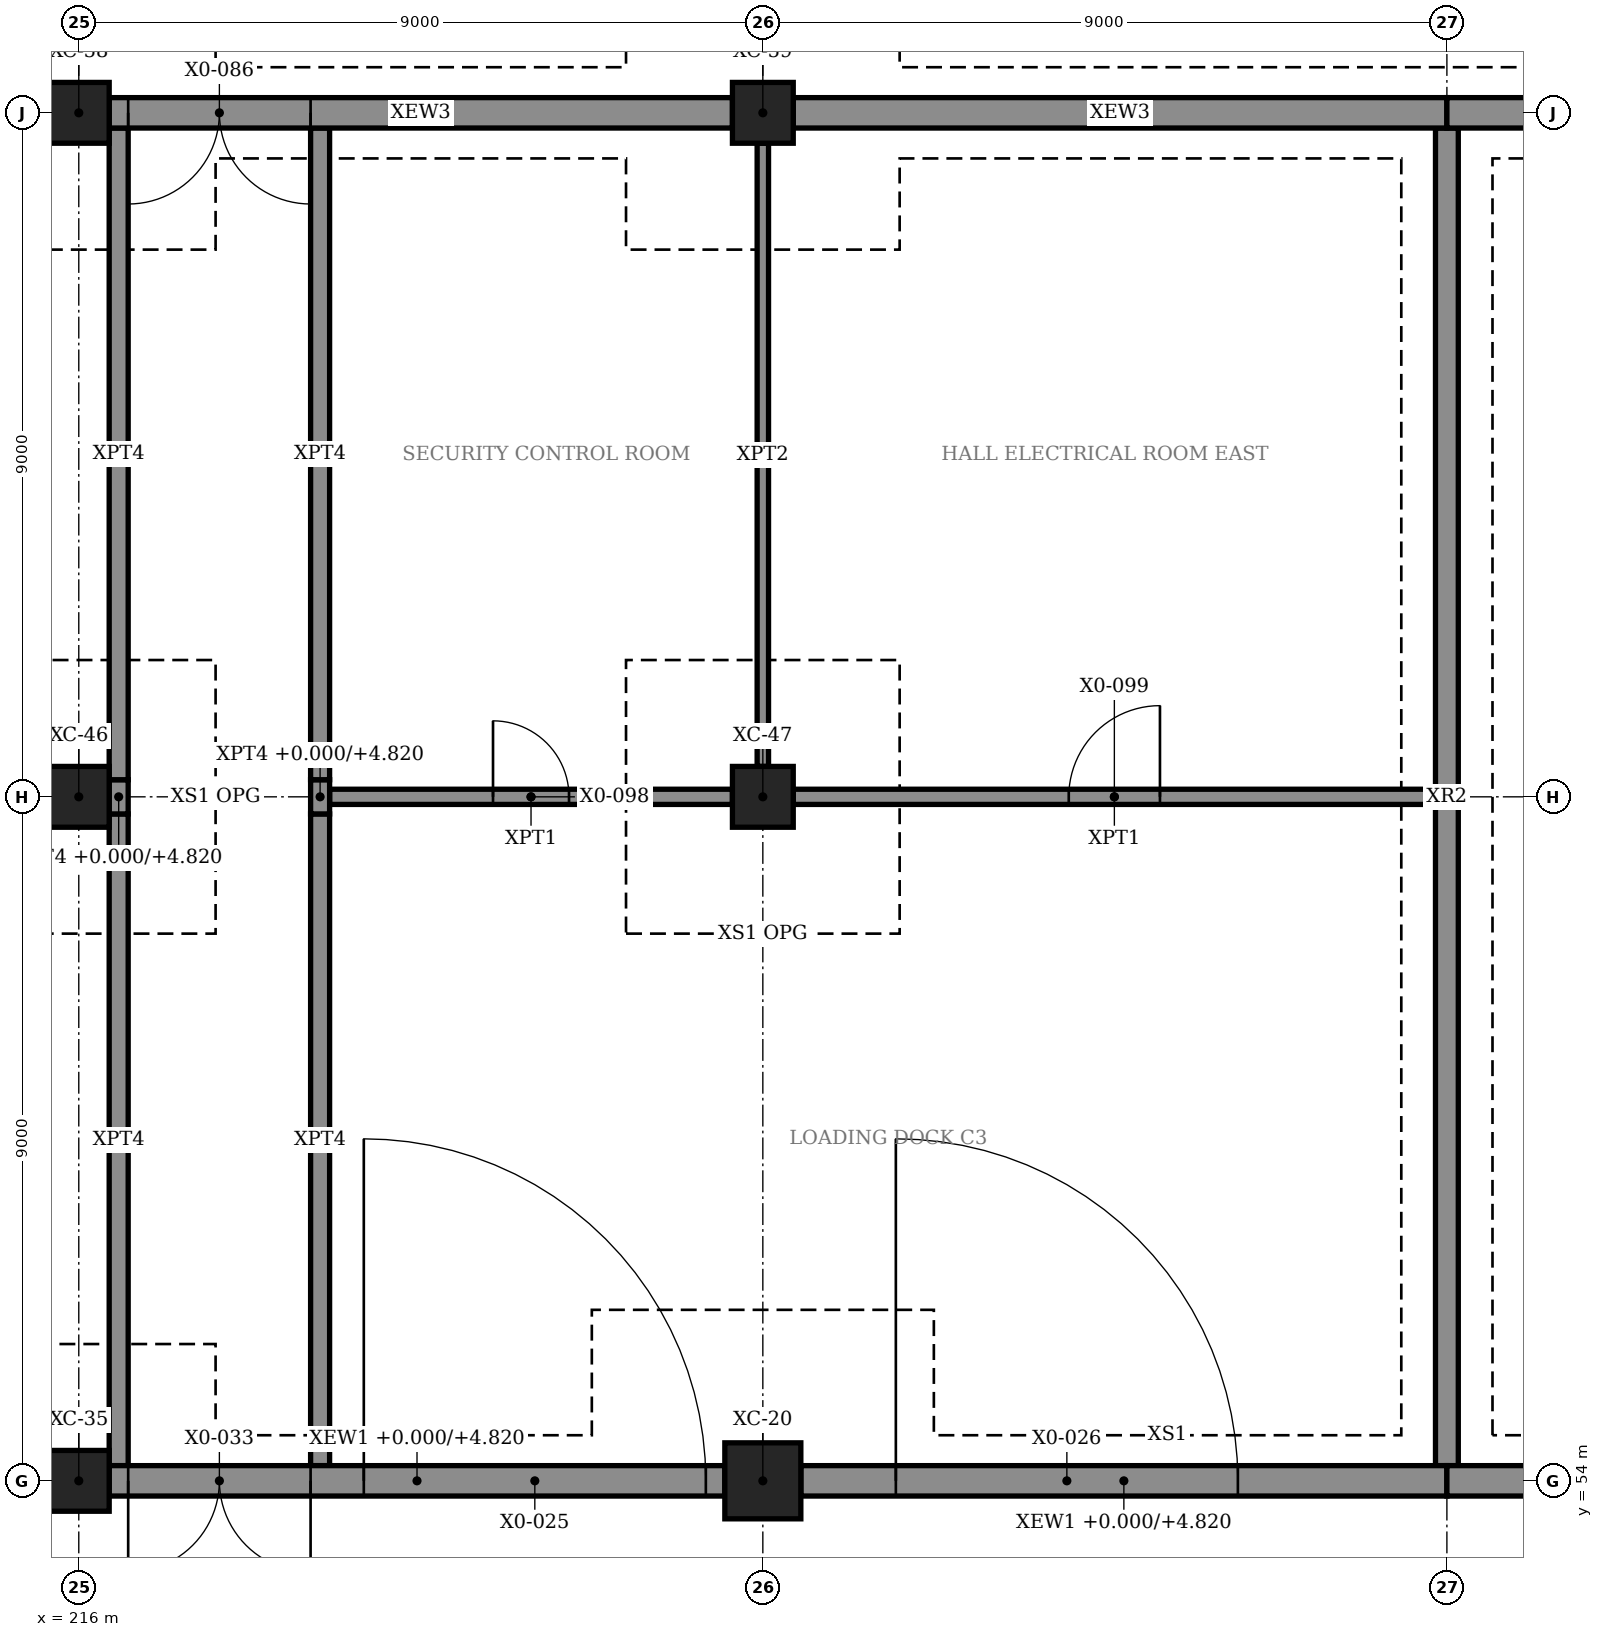
"""IFC4 building model, lengths in metres.
Left out: names, types, materials, properties, quantities, classifications, styles, units other than length and angle.
Written with IfcOpenShell. Run it as: python <this file> out.ifc"""

import sys

from ifc_helpers import new_model, si_unit, direction, frame, frame_2d, origin, origin_2d, place, context, subcontext, project, spatial, rectangle, hollow_rectangle, extrude, element, fill, save


model = new_model("IFC4")
c1 = context("Model", 3, precision=1e-05, world=origin(), true_north=direction((0.0, 1.0)))
c2 = subcontext(c1, "Body", "Model", "MODEL_VIEW")
j1 = project(units=[si_unit("LENGTHUNIT", "METRE"), si_unit("PLANEANGLEUNIT", "RADIAN")], contexts=[c1])
p1 = place(None, origin())
s1 = spatial("IfcSite", under=j1, at=p1, CompositionType="ELEMENT")
p2 = place(p1, origin())
s2 = spatial("IfcBuilding", under=s1, at=p2, CompositionType="ELEMENT")
p3 = place(p2, origin())
s3 = spatial("IfcBuildingStorey", under=s2, at=p3, CompositionType="ELEMENT", Elevation=0.0)
p4 = place(p3, frame((225.0, 54.0, 0.0), z_axis=(0.0, 0.0, 1.0), x_axis=(1.0, 0.0, 0.0)))
e1 = element("IfcColumn", 1, at=p4, inside=s3, PredefinedType="COLUMN", context=c2, shape_type="SweptSolid", body=[
    extrude(hollow_rectangle(XDim=1.0, YDim=1.0, WallThickness=0.032, at=origin_2d()), origin(), (0.0, 0.0, 1.0), 6.0),
])
for number, where, z_axis, x_axis in (
    (2, (216.0, 54.0, 0.0), (0.0, 0.0, 1.0), (1.0, 0.0, 0.0)),
    (3, (216.0, 63.0, 0.0), (0.0, 0.0, 1.0), (1.0, 0.0, 0.0)),
    (4, (225.0, 63.0, 0.0), (0.0, 0.0, 1.0), (1.0, 0.0, 0.0)),
    (5, (216.0, 72.0, 0.0), (0.0, 0.0, 1.0), (1.0, 0.0, 0.0)),
    (6, (225.0, 72.0, 0.0), (0.0, 0.0, 1.0), (1.0, 0.0, 0.0)),
):
    element("IfcColumn", number, at=place(p3, frame(where, z_axis=z_axis, x_axis=x_axis)), inside=s3, PredefinedType="COLUMN", context=c2, shape_type="SweptSolid", body=[
        extrude(rectangle(XDim=0.8, YDim=0.8, at=origin_2d()), origin(), (0.0, 0.0, 1.0), 6.0),
    ])
p5 = place(p3, frame((234.0, 54.2, 0.0), z_axis=(0.0, 0.0, 1.0), x_axis=(0.0, 1.0, 0.0)))
e7 = element("IfcWall", 7, at=p5, inside=s3, PredefinedType="SOLIDWALL", context=c2, shape_type="SweptSolid", body=[
    extrude(rectangle(XDim=17.6, YDim=0.3, at=frame_2d((8.8, 0.0))), origin(), (0.0, 0.0, 1.0), 5.72),
])
p6 = place(p3, frame((216.4, 54.0, 0.0), z_axis=(0.0, 0.0, 1.0), x_axis=(1.0, 0.0, 0.0)))
e8 = element("IfcWall", 8, at=p6, inside=s3, PredefinedType="SOLIDWALL", context=c2, shape_type="SweptSolid", body=[
    extrude(rectangle(XDim=8.1, YDim=0.4, at=frame_2d((4.05, 0.0))), origin(), (0.0, 0.0, 1.0), 4.82),
])
p7 = place(p6, frame((3.35, 0.0, 0.0)))
e9 = element("IfcOpeningElement", 9, at=p7, cuts=e8, PredefinedType="OPENING", context=c2, shape_type="SweptSolid", body=[
    extrude(rectangle(XDim=4.5, YDim=4.5, at=frame_2d((2.25, 2.25))), frame((0.0, 0.21, 0.0), z_axis=(0.0, -1.0, 0.0), x_axis=(1.0, 0.0, 0.0)), (0.0, 0.0, 1.0), 0.42),
])
p8 = place(p6, frame((0.25, 0.0, 0.0)))
e10 = element("IfcOpeningElement", 10, at=p8, cuts=e8, PredefinedType="OPENING", context=c2, shape_type="SweptSolid", body=[
    extrude(rectangle(XDim=2.4, YDim=2.4, at=frame_2d((1.2, 1.2))), frame((0.0, 0.21, 0.0), z_axis=(0.0, -1.0, 0.0), x_axis=(1.0, 0.0, 0.0)), (0.0, 0.0, 1.0), 0.42),
])
p9 = place(p3, frame((225.5, 54.0, 0.0), z_axis=(0.0, 0.0, 1.0), x_axis=(1.0, 0.0, 0.0)))
e11 = element("IfcWall", 11, at=p9, inside=s3, PredefinedType="SOLIDWALL", context=c2, shape_type="SweptSolid", body=[
    extrude(rectangle(XDim=8.5, YDim=0.4, at=frame_2d((4.25, 0.0))), origin(), (0.0, 0.0, 1.0), 4.82),
])
p10 = place(p9, frame((1.25, 0.0, 0.0)))
e12 = element("IfcOpeningElement", 12, at=p10, cuts=e11, PredefinedType="OPENING", context=c2, shape_type="SweptSolid", body=[
    extrude(rectangle(XDim=4.5, YDim=4.5, at=frame_2d((2.25, 2.25))), frame((0.0, 0.21, 0.0), z_axis=(0.0, -1.0, 0.0), x_axis=(1.0, 0.0, 0.0)), (0.0, 0.0, 1.0), 0.42),
])
p11 = place(p3, frame((234.0, 54.0, 0.0), z_axis=(0.0, 0.0, 1.0), x_axis=(1.0, 0.0, 0.0)))
e13 = element("IfcWall", 13, at=p11, inside=s3, PredefinedType="SOLIDWALL", context=c2, shape_type="SweptSolid", body=[
    extrude(rectangle(XDim=8.5, YDim=0.4, at=frame_2d((4.25, 0.0))), origin(), (0.0, 0.0, 1.0), 5.3),
])
p12 = place(p11, frame((1.9, 0.0, 0.0)))
e14 = element("IfcOpeningElement", 14, at=p12, cuts=e13, PredefinedType="OPENING", context=c2, shape_type="SweptSolid", body=[
    extrude(rectangle(XDim=5.2, YDim=5.2, at=frame_2d((2.6, 2.6))), frame((0.0, 0.21, 0.0), z_axis=(0.0, -1.0, 0.0), x_axis=(1.0, 0.0, 0.0)), (0.0, 0.0, 1.0), 0.42),
])
p13 = place(p3, frame((216.4, 72.0, 0.0), z_axis=(0.0, 0.0, 1.0), x_axis=(1.0, 0.0, 0.0)))
e15 = element("IfcWall", 15, at=p13, inside=s3, PredefinedType="SOLIDWALL", context=c2, shape_type="SweptSolid", body=[
    extrude(rectangle(XDim=8.2, YDim=0.4, at=frame_2d((4.1, 0.0))), origin(), (0.0, 0.0, 1.0), 4.82),
])
p14 = place(p13, frame((0.25, 0.0, 0.0)))
e16 = element("IfcOpeningElement", 16, at=p14, cuts=e15, PredefinedType="OPENING", context=c2, shape_type="SweptSolid", body=[
    extrude(rectangle(XDim=2.4, YDim=2.4, at=frame_2d((1.2, 1.2))), frame((0.0, 0.21, 0.0), z_axis=(0.0, -1.0, 0.0), x_axis=(1.0, 0.0, 0.0)), (0.0, 0.0, 1.0), 0.42),
])
p15 = place(p3, frame((225.4, 72.0, 0.0), z_axis=(0.0, 0.0, 1.0), x_axis=(1.0, 0.0, 0.0)))
e17 = element("IfcWall", 17, at=p15, inside=s3, PredefinedType="SOLIDWALL", context=c2, shape_type="SweptSolid", body=[
    extrude(rectangle(XDim=8.6, YDim=0.4, at=frame_2d((4.3, 0.0))), origin(), (0.0, 0.0, 1.0), 4.82),
])
p16 = place(p3, frame((234.0, 72.0, 0.0), z_axis=(0.0, 0.0, 1.0), x_axis=(1.0, 0.0, 0.0)))
e18 = element("IfcWall", 18, at=p16, inside=s3, PredefinedType="SOLIDWALL", context=c2, shape_type="SweptSolid", body=[
    extrude(rectangle(XDim=9.0, YDim=0.4, at=frame_2d((4.5, 0.0))), origin(), (0.0, 0.0, 1.0), 5.3),
])
p17 = place(p16, frame((1.9, 0.0, 0.0)))
e19 = element("IfcOpeningElement", 19, at=p17, cuts=e18, PredefinedType="OPENING", context=c2, shape_type="SweptSolid", body=[
    extrude(rectangle(XDim=5.2, YDim=5.2, at=frame_2d((2.6, 2.6))), frame((0.0, 0.21, 0.0), z_axis=(0.0, -1.0, 0.0), x_axis=(1.0, 0.0, 0.0)), (0.0, 0.0, 1.0), 0.42),
])
p18 = place(p3, frame((219.3, 63.0, 0.0), z_axis=(0.0, 0.0, 1.0), x_axis=(1.0, 0.0, 0.0)))
e20 = element("IfcWall", 20, at=p18, inside=s3, PredefinedType="PARTITIONING", context=c2, shape_type="SweptSolid", body=[
    extrude(rectangle(XDim=5.3, YDim=0.2, at=frame_2d((2.65, 0.0))), origin(), (0.0, 0.0, 1.0), 4.82),
])
p19 = place(p18, frame((2.15, 0.0, 0.015)))
e21 = element("IfcOpeningElement", 21, at=p19, cuts=e20, PredefinedType="OPENING", context=c2, shape_type="SweptSolid", body=[
    extrude(rectangle(XDim=1.0, YDim=2.4, at=frame_2d((0.5, 1.2))), frame((0.0, 0.11, 0.0), z_axis=(0.0, -1.0, 0.0), x_axis=(1.0, 0.0, 0.0)), (0.0, 0.0, 1.0), 0.22),
])
p20 = place(p3, frame((225.4, 63.0, 0.0), z_axis=(0.0, 0.0, 1.0), x_axis=(1.0, 0.0, 0.0)))
e22 = element("IfcWall", 22, at=p20, inside=s3, PredefinedType="PARTITIONING", context=c2, shape_type="SweptSolid", body=[
    extrude(rectangle(XDim=8.45, YDim=0.2, at=frame_2d((4.225, 0.0))), origin(), (0.0, 0.0, 1.0), 4.82),
])
p21 = place(p20, frame((3.625, 0.0, 0.015)))
e23 = element("IfcOpeningElement", 23, at=p21, cuts=e22, PredefinedType="OPENING", context=c2, shape_type="SweptSolid", body=[
    extrude(rectangle(XDim=1.2, YDim=2.4, at=frame_2d((0.6, 1.2))), frame((0.0, 0.11, 0.0), z_axis=(0.0, -1.0, 0.0), x_axis=(1.0, 0.0, 0.0)), (0.0, 0.0, 1.0), 0.22),
])
p22 = place(p3, frame((225.0, 63.4, 0.0), z_axis=(0.0, 0.0, 1.0), x_axis=(0.0, 1.0, 0.0)))
e24 = element("IfcWall", 24, at=p22, inside=s3, PredefinedType="PARTITIONING", context=c2, shape_type="SweptSolid", body=[
    extrude(rectangle(XDim=8.2, YDim=0.15, at=frame_2d((4.1, 0.0))), origin(), (0.0, 0.0, 1.0), 4.92),
])
p23 = place(p3, frame((216.525, 54.2, 0.0), z_axis=(0.0, 0.0, 1.0), x_axis=(0.0, 1.0, 0.0)))
e25 = element("IfcWall", 25, at=p23, inside=s3, PredefinedType="PARTITIONING", context=c2, shape_type="SweptSolid", body=[
    extrude(rectangle(XDim=8.575, YDim=0.25, at=frame_2d((4.288, 0.0))), origin(), (0.0, 0.0, 1.0), 5.72),
])
p24 = place(p3, frame((216.525, 62.775, 0.0), z_axis=(0.0, 0.0, 1.0), x_axis=(0.0, 1.0, 0.0)))
e26 = element("IfcWall", 26, at=p24, inside=s3, PredefinedType="PARTITIONING", context=c2, shape_type="SweptSolid", body=[
    extrude(rectangle(XDim=0.45, YDim=0.25, at=frame_2d((0.225, 0.0))), origin(), (0.0, 0.0, 1.0), 4.82),
])
for number, where, z_axis, x_axis in (
    (27, (216.525, 63.225, 0.0), (0.0, 0.0, 1.0), (0.0, 1.0, 0.0)),
    (28, (219.175, 54.2, 0.0), (0.0, 0.0, 1.0), (0.0, 1.0, 0.0)),
):
    element("IfcWall", number, at=place(p3, frame(where, z_axis=z_axis, x_axis=x_axis)), inside=s3, PredefinedType="PARTITIONING", context=c2, shape_type="SweptSolid", body=[
        extrude(rectangle(XDim=8.575, YDim=0.25, at=frame_2d((4.288, 0.0))), origin(), (0.0, 0.0, 1.0), 5.72),
    ])
p25 = place(p3, frame((219.175, 62.775, 0.0), z_axis=(0.0, 0.0, 1.0), x_axis=(0.0, 1.0, 0.0)))
e29 = element("IfcWall", 29, at=p25, inside=s3, PredefinedType="PARTITIONING", context=c2, shape_type="SweptSolid", body=[
    extrude(rectangle(XDim=0.45, YDim=0.25, at=frame_2d((0.225, 0.0))), origin(), (0.0, 0.0, 1.0), 4.82),
])
p26 = place(p3, frame((219.175, 63.225, 0.0), z_axis=(0.0, 0.0, 1.0), x_axis=(0.0, 1.0, 0.0)))
e30 = element("IfcWall", 30, at=p26, inside=s3, PredefinedType="PARTITIONING", context=c2, shape_type="SweptSolid", body=[
    extrude(rectangle(XDim=8.575, YDim=0.25, at=frame_2d((4.288, 0.0))), origin(), (0.0, 0.0, 1.0), 5.72),
])
p27 = place(p7, origin())
e31 = element("IfcDoor", 31, at=p27, inside=s3, OperationType="ROLLINGUP", PredefinedType="DOOR", context=c2, shape_type="SweptSolid", body=[
    extrude(rectangle(XDim=4.5, YDim=4.5, at=frame_2d((2.25, 2.25))), frame((0.0, 0.025, 0.0), z_axis=(0.0, -1.0, 0.0), x_axis=(1.0, 0.0, 0.0)), (0.0, 0.0, 1.0), 0.05),
])
fill(e9, e31)
p28 = place(p10, origin())
e32 = element("IfcDoor", 32, at=p28, inside=s3, OperationType="ROLLINGUP", PredefinedType="DOOR", context=c2, shape_type="SweptSolid", body=[
    extrude(rectangle(XDim=4.5, YDim=4.5, at=frame_2d((2.25, 2.25))), frame((0.0, 0.025, 0.0), z_axis=(0.0, -1.0, 0.0), x_axis=(1.0, 0.0, 0.0)), (0.0, 0.0, 1.0), 0.05),
])
fill(e12, e32)
p29 = place(p8, frame((2.4, 0.0, 0.0), z_axis=(0.0, 0.0, 1.0), x_axis=(-1.0, 0.0, 0.0)))
e33 = element("IfcDoor", 33, at=p29, inside=s3, OperationType="DOUBLE_DOOR_SINGLE_SWING", PredefinedType="DOOR", context=c2, shape_type="SweptSolid", body=[
    extrude(rectangle(XDim=2.4, YDim=2.4, at=frame_2d((1.2, 1.2))), frame((0.0, 0.025, 0.0), z_axis=(0.0, -1.0, 0.0), x_axis=(1.0, 0.0, 0.0)), (0.0, 0.0, 1.0), 0.05),
])
fill(e10, e33)
p30 = place(p14, frame((2.4, 0.0, 0.0), z_axis=(0.0, 0.0, 1.0), x_axis=(-1.0, 0.0, 0.0)))
e34 = element("IfcDoor", 34, at=p30, inside=s3, OperationType="DOUBLE_DOOR_SINGLE_SWING", PredefinedType="DOOR", context=c2, shape_type="SweptSolid", body=[
    extrude(rectangle(XDim=2.4, YDim=2.4, at=frame_2d((1.2, 1.2))), frame((0.0, 0.025, 0.0), z_axis=(0.0, -1.0, 0.0), x_axis=(1.0, 0.0, 0.0)), (0.0, 0.0, 1.0), 0.05),
])
fill(e16, e34)
p31 = place(p19, origin())
e35 = element("IfcDoor", 35, at=p31, inside=s3, OperationType="SINGLE_SWING_LEFT", PredefinedType="DOOR", context=c2, shape_type="SweptSolid", body=[
    extrude(rectangle(XDim=1.0, YDim=2.4, at=frame_2d((0.5, 1.2))), frame((0.0, 0.025, 0.0), z_axis=(0.0, -1.0, 0.0), x_axis=(1.0, 0.0, 0.0)), (0.0, 0.0, 1.0), 0.05),
])
fill(e21, e35)
p32 = place(p21, origin())
e36 = element("IfcDoor", 36, at=p32, inside=s3, OperationType="SINGLE_SWING_RIGHT", PredefinedType="DOOR", context=c2, shape_type="SweptSolid", body=[
    extrude(rectangle(XDim=1.2, YDim=2.4, at=frame_2d((0.6, 1.2))), frame((0.0, 0.025, 0.0), z_axis=(0.0, -1.0, 0.0), x_axis=(1.0, 0.0, 0.0)), (0.0, 0.0, 1.0), 0.05),
])
fill(e23, e36)
save(model, sys.argv[1])
